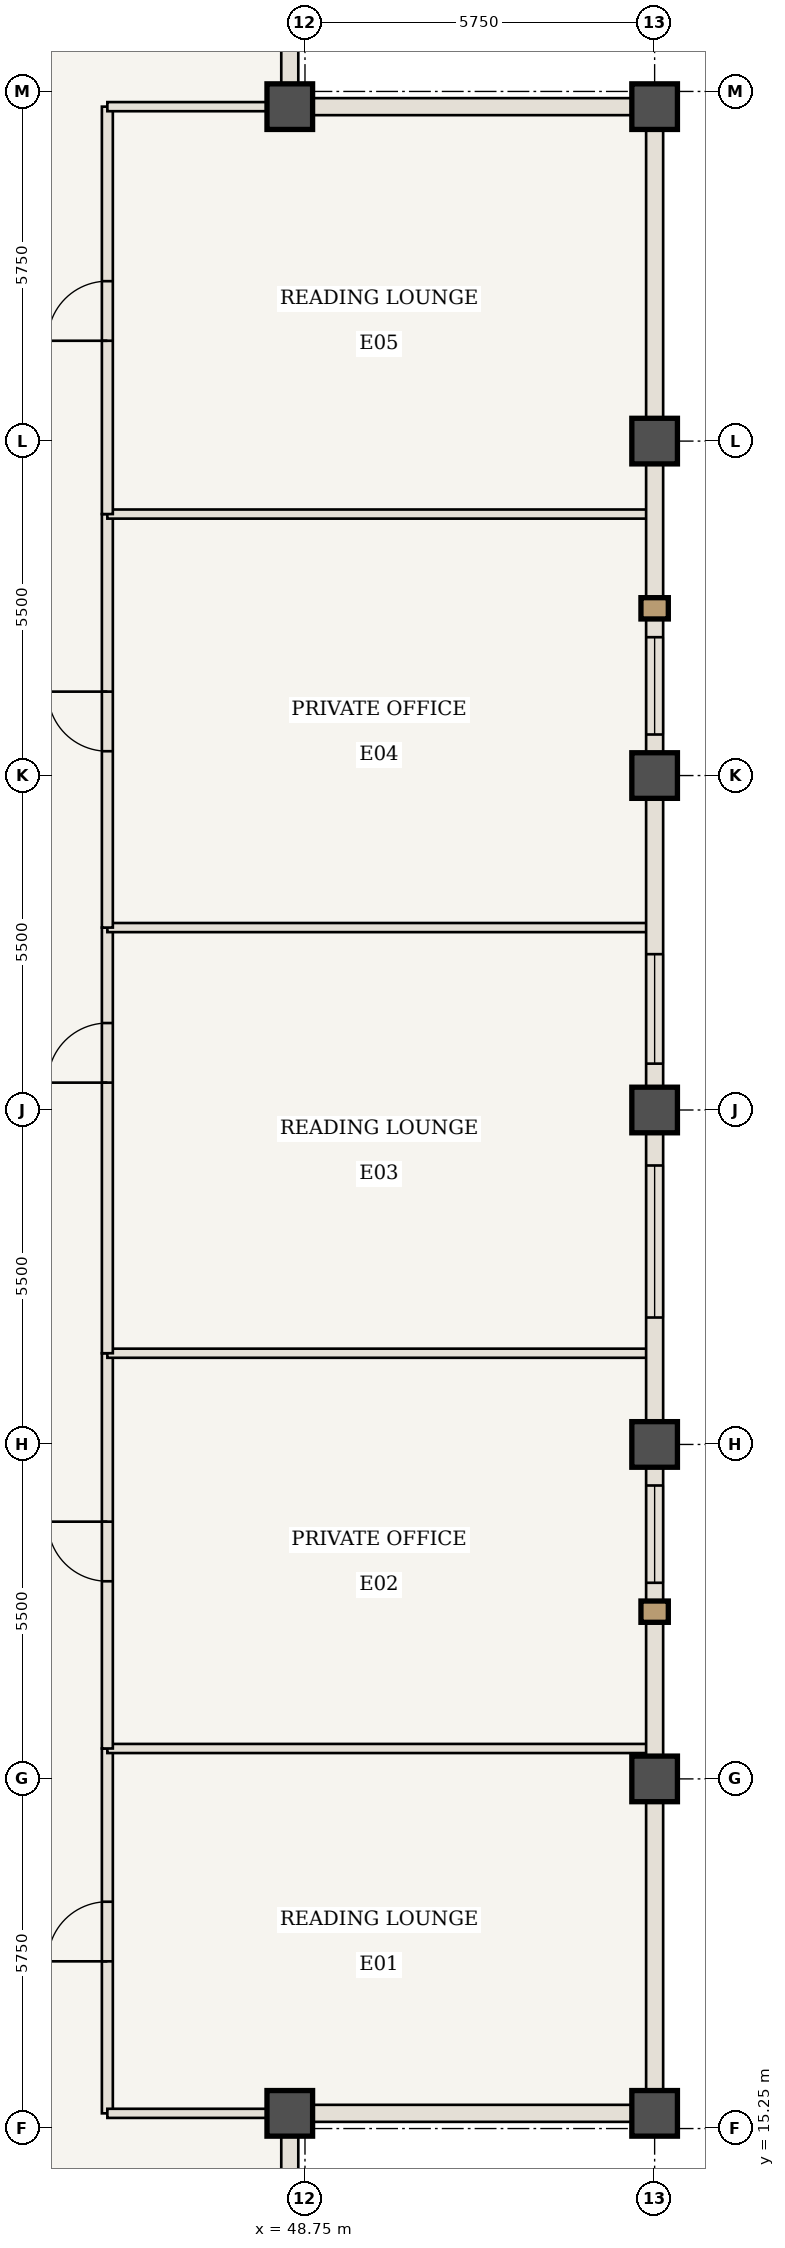
"""IFC4 building model, lengths in metres.
Left out: names, types, materials, properties, quantities, classifications, styles, units other than length and angle.
Written with IfcOpenShell. Run it as: python <this file> out.ifc"""

import sys

from ifc_helpers import new_model, si_unit, direction, frame, frame_2d, origin, origin_2d, place, context, subcontext, project, spatial, rectangle, extrude, element, fill, save


model = new_model("IFC4")
c1 = context("Model", 3, precision=1e-05, world=origin(), true_north=direction((0.0, 1.0)))
c2 = subcontext(c1, "Body", "Model", "MODEL_VIEW")
j1 = project(units=[si_unit("LENGTHUNIT", "METRE"), si_unit("PLANEANGLEUNIT", "RADIAN")], contexts=[c1])
p1 = place(None, origin())
s1 = spatial("IfcSite", under=j1, at=p1, CompositionType="ELEMENT")
p2 = place(p1, origin())
s2 = spatial("IfcBuilding", under=s1, at=p2, CompositionType="ELEMENT")
p3 = place(p2, frame((0.0, 0.0, 285.25)))
s3 = spatial("IfcBuildingStorey", under=s2, at=p3, CompositionType="ELEMENT", Elevation=285.25)
for number, where, z_axis, x_axis in (
    (1, (48.5, 15.5, 0.0), (0.0, 0.0, 1.0), (1.0, 0.0, 0.0)),
    (2, (54.5, 15.5, 0.0), (0.0, 0.0, 1.0), (1.0, 0.0, 0.0)),
    (3, (54.5, 48.5, 0.0), (0.0, 0.0, 1.0), (1.0, 0.0, 0.0)),
    (4, (48.5, 48.5, 0.0), (0.0, 0.0, 1.0), (1.0, 0.0, 0.0)),
    (5, (54.5, 21.0, 0.0), (0.0, 0.0, 1.0), (1.0, 0.0, 0.0)),
    (6, (54.5, 26.5, 0.0), (0.0, 0.0, 1.0), (1.0, 0.0, 0.0)),
    (7, (54.5, 32.0, 0.0), (0.0, 0.0, 1.0), (1.0, 0.0, 0.0)),
    (8, (54.5, 37.5, 0.0), (0.0, 0.0, 1.0), (1.0, 0.0, 0.0)),
    (9, (54.5, 43.0, 0.0), (0.0, 0.0, 1.0), (1.0, 0.0, 0.0)),
):
    element("IfcColumn", number, at=place(p3, frame(where, z_axis=z_axis, x_axis=x_axis)), inside=s3, PredefinedType="COLUMN", context=c2, shape_type="SweptSolid", body=[
        extrude(rectangle(XDim=0.75, YDim=0.75, at=origin_2d()), origin(), (0.0, 0.0, 1.0), 3.85),
    ])
p4 = place(p3, frame((45.5, 15.5, 0.0), z_axis=(0.0, 0.0, 1.0), x_axis=(0.0, 1.0, 0.0)))
e10 = element("IfcWall", 10, at=p4, inside=s3, PredefinedType="STANDARD", context=c2, shape_type="SweptSolid", body=[
    extrude(rectangle(XDim=6.0, YDim=0.18, at=frame_2d((3.0, 0.0))), origin(), (0.0, 0.0, 1.0), 3.685),
])
p5 = place(p4, frame((2.5, 0.0, 0.0)))
e11 = element("IfcOpeningElement", 11, at=p5, cuts=e10, PredefinedType="OPENING", context=c2, shape_type="SweptSolid", body=[
    extrude(rectangle(XDim=0.98, YDim=2.2, at=frame_2d((0.49, 1.1))), frame((0.0, 0.1, 0.0), z_axis=(0.0, -1.0, 0.0), x_axis=(1.0, 0.0, 0.0)), (0.0, 0.0, 1.0), 0.2),
])
p6 = place(p3, frame((45.5, 21.5, 0.0), z_axis=(0.0, 0.0, 1.0), x_axis=(1.0, 0.0, 0.0)))
e12 = element("IfcWall", 12, at=p6, inside=s3, PredefinedType="STANDARD", context=c2, shape_type="SweptSolid", body=[
    extrude(rectangle(XDim=8.94, YDim=0.15, at=frame_2d((4.47, 0.0))), origin(), (0.0, 0.0, 1.0), 3.685),
])
p7 = place(p3, frame((45.5, 21.5, 0.0), z_axis=(0.0, 0.0, 1.0), x_axis=(0.0, 1.0, 0.0)))
e13 = element("IfcWall", 13, at=p7, inside=s3, PredefinedType="STANDARD", context=c2, shape_type="SweptSolid", body=[
    extrude(rectangle(XDim=6.5, YDim=0.18, at=frame_2d((3.25, 0.0))), origin(), (0.0, 0.0, 1.0), 3.685),
])
p8 = place(p7, frame((2.75, 0.0, 0.0)))
e14 = element("IfcOpeningElement", 14, at=p8, cuts=e13, PredefinedType="OPENING", context=c2, shape_type="SweptSolid", body=[
    extrude(rectangle(XDim=0.98, YDim=2.2, at=frame_2d((0.49, 1.1))), frame((0.0, 0.1, 0.0), z_axis=(0.0, -1.0, 0.0), x_axis=(1.0, 0.0, 0.0)), (0.0, 0.0, 1.0), 0.2),
])
p9 = place(p3, frame((45.5, 28.0, 0.0), z_axis=(0.0, 0.0, 1.0), x_axis=(1.0, 0.0, 0.0)))
e15 = element("IfcWall", 15, at=p9, inside=s3, PredefinedType="STANDARD", context=c2, shape_type="SweptSolid", body=[
    extrude(rectangle(XDim=8.94, YDim=0.15, at=frame_2d((4.47, 0.0))), origin(), (0.0, 0.0, 1.0), 3.685),
])
p10 = place(p3, frame((45.5, 28.0, 0.0), z_axis=(0.0, 0.0, 1.0), x_axis=(0.0, 1.0, 0.0)))
e16 = element("IfcWall", 16, at=p10, inside=s3, PredefinedType="STANDARD", context=c2, shape_type="SweptSolid", body=[
    extrude(rectangle(XDim=7.0, YDim=0.18, at=frame_2d((3.5, 0.0))), origin(), (0.0, 0.0, 1.0), 3.685),
])
p11 = place(p10, frame((4.45, 0.0, 0.0)))
e17 = element("IfcOpeningElement", 17, at=p11, cuts=e16, PredefinedType="OPENING", context=c2, shape_type="SweptSolid", body=[
    extrude(rectangle(XDim=0.98, YDim=2.2, at=frame_2d((0.49, 1.1))), frame((0.0, 0.1, 0.0), z_axis=(0.0, -1.0, 0.0), x_axis=(1.0, 0.0, 0.0)), (0.0, 0.0, 1.0), 0.2),
])
p12 = place(p3, frame((45.5, 35.0, 0.0), z_axis=(0.0, 0.0, 1.0), x_axis=(1.0, 0.0, 0.0)))
e18 = element("IfcWall", 18, at=p12, inside=s3, PredefinedType="STANDARD", context=c2, shape_type="SweptSolid", body=[
    extrude(rectangle(XDim=8.94, YDim=0.15, at=frame_2d((4.47, 0.0))), origin(), (0.0, 0.0, 1.0), 3.685),
])
p13 = place(p3, frame((45.5, 35.0, 0.0), z_axis=(0.0, 0.0, 1.0), x_axis=(0.0, 1.0, 0.0)))
e19 = element("IfcWall", 19, at=p13, inside=s3, PredefinedType="STANDARD", context=c2, shape_type="SweptSolid", body=[
    extrude(rectangle(XDim=6.8, YDim=0.18, at=frame_2d((3.4, 0.0))), origin(), (0.0, 0.0, 1.0), 3.685),
])
p14 = place(p13, frame((2.9, 0.0, 0.0)))
e20 = element("IfcOpeningElement", 20, at=p14, cuts=e19, PredefinedType="OPENING", context=c2, shape_type="SweptSolid", body=[
    extrude(rectangle(XDim=0.98, YDim=2.2, at=frame_2d((0.49, 1.1))), frame((0.0, 0.1, 0.0), z_axis=(0.0, -1.0, 0.0), x_axis=(1.0, 0.0, 0.0)), (0.0, 0.0, 1.0), 0.2),
])
p15 = place(p3, frame((45.5, 41.8, 0.0), z_axis=(0.0, 0.0, 1.0), x_axis=(1.0, 0.0, 0.0)))
e21 = element("IfcWall", 21, at=p15, inside=s3, PredefinedType="STANDARD", context=c2, shape_type="SweptSolid", body=[
    extrude(rectangle(XDim=8.94, YDim=0.15, at=frame_2d((4.47, 0.0))), origin(), (0.0, 0.0, 1.0), 3.685),
])
p16 = place(p3, frame((45.5, 41.8, 0.0), z_axis=(0.0, 0.0, 1.0), x_axis=(0.0, 1.0, 0.0)))
e22 = element("IfcWall", 22, at=p16, inside=s3, PredefinedType="STANDARD", context=c2, shape_type="SweptSolid", body=[
    extrude(rectangle(XDim=6.7, YDim=0.18, at=frame_2d((3.35, 0.0))), origin(), (0.0, 0.0, 1.0), 3.685),
])
p17 = place(p16, frame((2.85, 0.0, 0.0)))
e23 = element("IfcOpeningElement", 23, at=p17, cuts=e22, PredefinedType="OPENING", context=c2, shape_type="SweptSolid", body=[
    extrude(rectangle(XDim=0.98, YDim=2.2, at=frame_2d((0.49, 1.1))), frame((0.0, 0.1, 0.0), z_axis=(0.0, -1.0, 0.0), x_axis=(1.0, 0.0, 0.0)), (0.0, 0.0, 1.0), 0.2),
])
for number, where, z_axis, x_axis in (
    (24, (45.5, 15.5, 0.0), (0.0, 0.0, 1.0), (1.0, 0.0, 0.0)),
    (25, (45.5, 48.5, 0.0), (0.0, 0.0, 1.0), (1.0, 0.0, 0.0)),
):
    element("IfcWall", number, at=place(p3, frame(where, z_axis=z_axis, x_axis=x_axis)), inside=s3, PredefinedType="STANDARD", context=c2, shape_type="SweptSolid", body=[
        extrude(rectangle(XDim=3.0, YDim=0.15, at=frame_2d((1.5, 0.0))), origin(), (0.0, 0.0, 1.0), 3.685),
    ])
p18 = place(p3, frame((54.5, 21.0, 0.0), z_axis=(0.0, 0.0, 1.0), x_axis=(0.0, -1.0, 0.0)))
e26 = element("IfcWall", 26, at=p18, inside=s3, PredefinedType="USERDEFINED", context=c2, shape_type="SweptSolid", body=[
    extrude(rectangle(XDim=5.5, YDim=0.28, at=frame_2d((2.75, 0.0))), origin(), (0.0, 0.0, 1.0), 2.985),
])
p19 = place(p3, frame((54.5, 26.5, 0.0), z_axis=(0.0, 0.0, 1.0), x_axis=(0.0, -1.0, 0.0)))
e27 = element("IfcWall", 27, at=p19, inside=s3, PredefinedType="USERDEFINED", context=c2, shape_type="SweptSolid", body=[
    extrude(rectangle(XDim=5.5, YDim=0.28, at=frame_2d((2.75, 0.0))), origin(), (0.0, 0.0, 1.0), 2.985),
])
p20 = place(p19, frame((0.675, 0.0, 0.85)))
e28 = element("IfcOpeningElement", 28, at=p20, cuts=e27, PredefinedType="OPENING", context=c2, shape_type="SweptSolid", body=[
    extrude(rectangle(XDim=1.6, YDim=1.935, at=frame_2d((0.8, 0.968))), frame((0.0, 0.15, 0.0), z_axis=(0.0, -1.0, 0.0), x_axis=(1.0, 0.0, 0.0)), (0.0, 0.0, 1.0), 0.3),
])
p21 = place(p3, frame((54.5, 32.0, 0.0), z_axis=(0.0, 0.0, 1.0), x_axis=(0.0, -1.0, 0.0)))
e29 = element("IfcWall", 29, at=p21, inside=s3, PredefinedType="USERDEFINED", context=c2, shape_type="SweptSolid", body=[
    extrude(rectangle(XDim=5.5, YDim=0.28, at=frame_2d((2.75, 0.0))), origin(), (0.0, 0.0, 1.0), 2.985),
])
p22 = place(p21, frame((0.913, 0.0, 0.85)))
e30 = element("IfcOpeningElement", 30, at=p22, cuts=e29, PredefinedType="OPENING", context=c2, shape_type="SweptSolid", body=[
    extrude(rectangle(XDim=2.5, YDim=1.935, at=frame_2d((1.25, 0.968))), frame((0.0, 0.15, 0.0), z_axis=(0.0, -1.0, 0.0), x_axis=(1.0, 0.0, 0.0)), (0.0, 0.0, 1.0), 0.3),
])
p23 = place(p3, frame((54.5, 37.5, 0.0), z_axis=(0.0, 0.0, 1.0), x_axis=(0.0, -1.0, 0.0)))
e31 = element("IfcWall", 31, at=p23, inside=s3, PredefinedType="USERDEFINED", context=c2, shape_type="SweptSolid", body=[
    extrude(rectangle(XDim=5.5, YDim=0.28, at=frame_2d((2.75, 0.0))), origin(), (0.0, 0.0, 1.0), 2.985),
])
p24 = place(p23, frame((2.938, 0.0, 0.85)))
e32 = element("IfcOpeningElement", 32, at=p24, cuts=e31, PredefinedType="OPENING", context=c2, shape_type="SweptSolid", body=[
    extrude(rectangle(XDim=1.8, YDim=1.935, at=frame_2d((0.9, 0.968))), frame((0.0, 0.15, 0.0), z_axis=(0.0, -1.0, 0.0), x_axis=(1.0, 0.0, 0.0)), (0.0, 0.0, 1.0), 0.3),
])
p25 = place(p3, frame((54.5, 43.0, 0.0), z_axis=(0.0, 0.0, 1.0), x_axis=(0.0, -1.0, 0.0)))
e33 = element("IfcWall", 33, at=p25, inside=s3, PredefinedType="USERDEFINED", context=c2, shape_type="SweptSolid", body=[
    extrude(rectangle(XDim=5.5, YDim=0.28, at=frame_2d((2.75, 0.0))), origin(), (0.0, 0.0, 1.0), 2.985),
])
p26 = place(p25, frame((3.225, 0.0, 0.85)))
e34 = element("IfcOpeningElement", 34, at=p26, cuts=e33, PredefinedType="OPENING", context=c2, shape_type="SweptSolid", body=[
    extrude(rectangle(XDim=1.6, YDim=1.935, at=frame_2d((0.8, 0.968))), frame((0.0, 0.15, 0.0), z_axis=(0.0, -1.0, 0.0), x_axis=(1.0, 0.0, 0.0)), (0.0, 0.0, 1.0), 0.3),
])
p27 = place(p3, frame((54.5, 48.5, 0.0), z_axis=(0.0, 0.0, 1.0), x_axis=(0.0, -1.0, 0.0)))
e35 = element("IfcWall", 35, at=p27, inside=s3, PredefinedType="USERDEFINED", context=c2, shape_type="SweptSolid", body=[
    extrude(rectangle(XDim=5.5, YDim=0.28, at=frame_2d((2.75, 0.0))), origin(), (0.0, 0.0, 1.0), 2.985),
])
for number, where, z_axis, x_axis in (
    (36, (48.5, 15.5, 0.0), (0.0, 0.0, 1.0), (0.0, -1.0, 0.0)),
    (37, (54.5, 15.5, 0.0), (0.0, 0.0, 1.0), (-1.0, 0.0, 0.0)),
    (38, (48.5, 48.5, 0.0), (0.0, 0.0, 1.0), (1.0, 0.0, 0.0)),
    (39, (48.5, 54.5, 0.0), (0.0, 0.0, 1.0), (0.0, -1.0, 0.0)),
):
    element("IfcWall", number, at=place(p3, frame(where, z_axis=z_axis, x_axis=x_axis)), inside=s3, PredefinedType="USERDEFINED", context=c2, shape_type="SweptSolid", body=[
        extrude(rectangle(XDim=6.0, YDim=0.28, at=frame_2d((3.0, 0.0))), origin(), (0.0, 0.0, 1.0), 2.985),
    ])
p28 = place(p5, origin())
e40 = element("IfcDoor", 40, at=p28, inside=s3, OperationType="SINGLE_SWING_LEFT", PredefinedType="DOOR", context=c2, shape_type="SweptSolid", body=[
    extrude(rectangle(XDim=0.98, YDim=2.2, at=frame_2d((0.49, 1.1))), frame((0.0, 0.025, 0.0), z_axis=(0.0, -1.0, 0.0), x_axis=(1.0, 0.0, 0.0)), (0.0, 0.0, 1.0), 0.05),
])
fill(e11, e40)
p29 = place(p8, origin())
e41 = element("IfcDoor", 41, at=p29, inside=s3, OperationType="SINGLE_SWING_RIGHT", PredefinedType="DOOR", context=c2, shape_type="SweptSolid", body=[
    extrude(rectangle(XDim=0.98, YDim=2.2, at=frame_2d((0.49, 1.1))), frame((0.0, 0.025, 0.0), z_axis=(0.0, -1.0, 0.0), x_axis=(1.0, 0.0, 0.0)), (0.0, 0.0, 1.0), 0.05),
])
fill(e14, e41)
p30 = place(p11, origin())
e42 = element("IfcDoor", 42, at=p30, inside=s3, OperationType="SINGLE_SWING_LEFT", PredefinedType="DOOR", context=c2, shape_type="SweptSolid", body=[
    extrude(rectangle(XDim=0.98, YDim=2.2, at=frame_2d((0.49, 1.1))), frame((0.0, 0.025, 0.0), z_axis=(0.0, -1.0, 0.0), x_axis=(1.0, 0.0, 0.0)), (0.0, 0.0, 1.0), 0.05),
])
fill(e17, e42)
p31 = place(p14, origin())
e43 = element("IfcDoor", 43, at=p31, inside=s3, OperationType="SINGLE_SWING_RIGHT", PredefinedType="DOOR", context=c2, shape_type="SweptSolid", body=[
    extrude(rectangle(XDim=0.98, YDim=2.2, at=frame_2d((0.49, 1.1))), frame((0.0, 0.025, 0.0), z_axis=(0.0, -1.0, 0.0), x_axis=(1.0, 0.0, 0.0)), (0.0, 0.0, 1.0), 0.05),
])
fill(e20, e43)
p32 = place(p17, origin())
e44 = element("IfcDoor", 44, at=p32, inside=s3, OperationType="SINGLE_SWING_LEFT", PredefinedType="DOOR", context=c2, shape_type="SweptSolid", body=[
    extrude(rectangle(XDim=0.98, YDim=2.2, at=frame_2d((0.49, 1.1))), frame((0.0, 0.025, 0.0), z_axis=(0.0, -1.0, 0.0), x_axis=(1.0, 0.0, 0.0)), (0.0, 0.0, 1.0), 0.05),
])
fill(e23, e44)
p33 = place(p20, origin())
e45 = element("IfcWindow", 45, at=p33, inside=s3, PartitioningType="SINGLE_PANEL", PredefinedType="WINDOW", context=c2, shape_type="SweptSolid", body=[
    extrude(rectangle(XDim=1.6, YDim=1.935, at=frame_2d((0.8, 0.968))), frame((0.0, 0.03, 0.0), z_axis=(0.0, -1.0, 0.0), x_axis=(1.0, 0.0, 0.0)), (0.0, 0.0, 1.0), 0.06),
])
fill(e28, e45)
p34 = place(p22, origin())
e46 = element("IfcWindow", 46, at=p34, inside=s3, PartitioningType="SINGLE_PANEL", PredefinedType="WINDOW", context=c2, shape_type="SweptSolid", body=[
    extrude(rectangle(XDim=2.5, YDim=1.935, at=frame_2d((1.25, 0.968))), frame((0.0, 0.03, 0.0), z_axis=(0.0, -1.0, 0.0), x_axis=(1.0, 0.0, 0.0)), (0.0, 0.0, 1.0), 0.06),
])
fill(e30, e46)
p35 = place(p24, origin())
e47 = element("IfcWindow", 47, at=p35, inside=s3, PartitioningType="SINGLE_PANEL", PredefinedType="WINDOW", context=c2, shape_type="SweptSolid", body=[
    extrude(rectangle(XDim=1.8, YDim=1.935, at=frame_2d((0.9, 0.968))), frame((0.0, 0.03, 0.0), z_axis=(0.0, -1.0, 0.0), x_axis=(1.0, 0.0, 0.0)), (0.0, 0.0, 1.0), 0.06),
])
fill(e32, e47)
p36 = place(p26, origin())
e48 = element("IfcWindow", 48, at=p36, inside=s3, PartitioningType="SINGLE_PANEL", PredefinedType="WINDOW", context=c2, shape_type="SweptSolid", body=[
    extrude(rectangle(XDim=1.6, YDim=1.935, at=frame_2d((0.8, 0.968))), frame((0.0, 0.03, 0.0), z_axis=(0.0, -1.0, 0.0), x_axis=(1.0, 0.0, 0.0)), (0.0, 0.0, 1.0), 0.06),
])
fill(e34, e48)
save(model, sys.argv[1])
